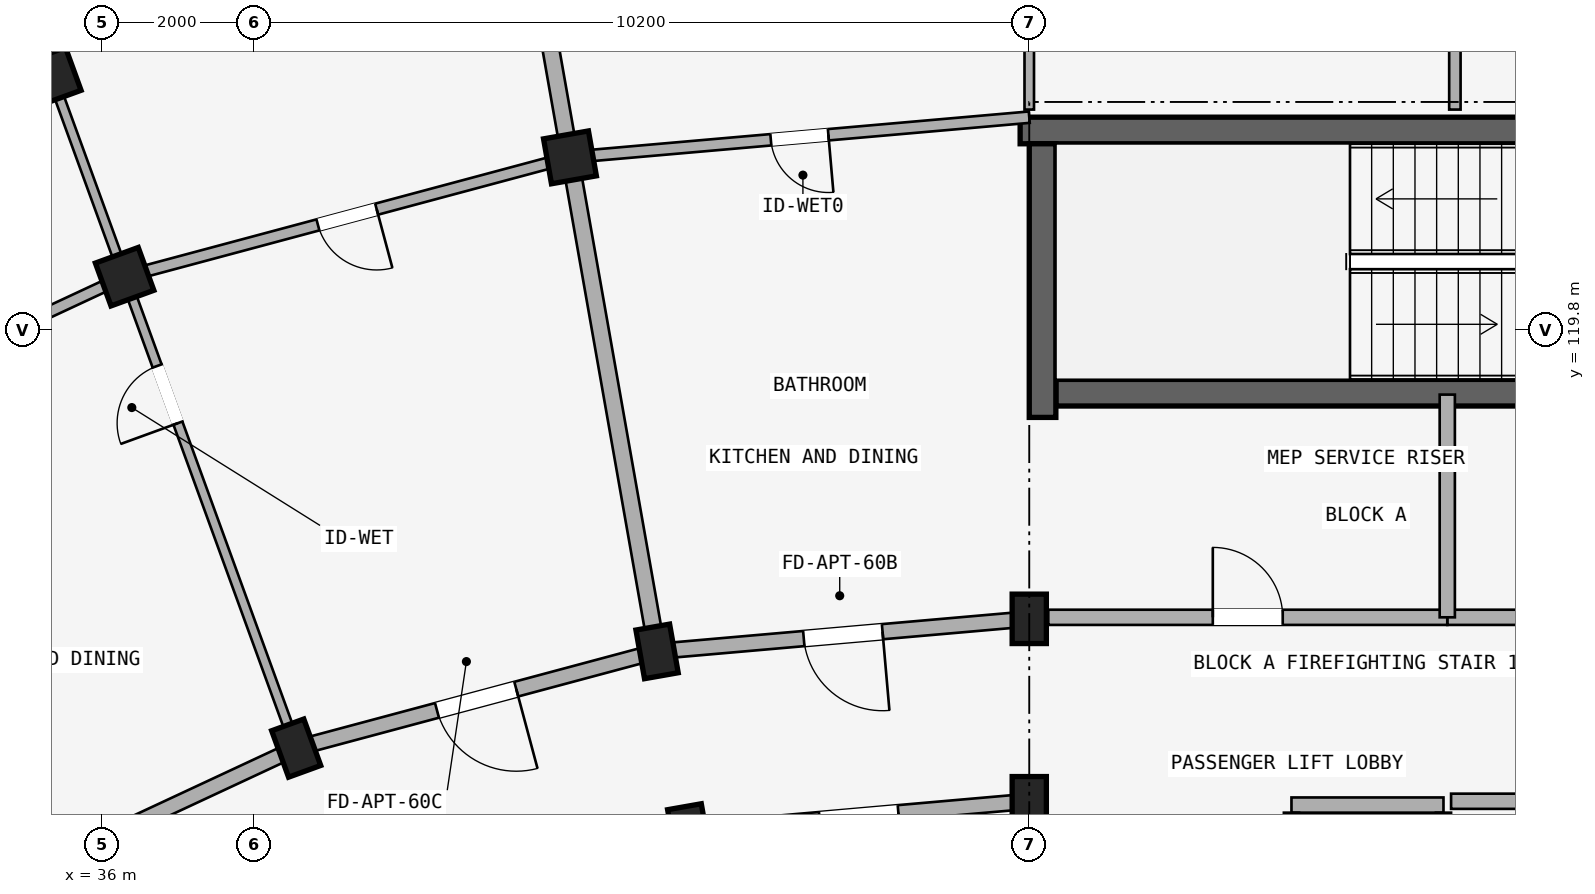
"""IFC4 building model, lengths in metres.
Left out: names, types, materials, properties, quantities, classifications, styles, units other than length and angle.
Written with IfcOpenShell. Run it as: python <this file> out.ifc"""

import sys

from ifc_helpers import new_model, si_unit, direction, frame, frame_2d, origin, origin_2d, place, context, subcontext, project, spatial, rectangle, extrude, element, fill, save


model = new_model("IFC4")
c1 = context("Model", 3, precision=1e-05, world=origin(), true_north=direction((0.0, 1.0)))
c2 = subcontext(c1, "Body", "Model", "MODEL_VIEW")
j1 = project(units=[si_unit("LENGTHUNIT", "METRE"), si_unit("PLANEANGLEUNIT", "RADIAN")], contexts=[c1])
p1 = place(None, origin())
s1 = spatial("IfcSite", under=j1, at=p1, CompositionType="ELEMENT")
p2 = place(p1, origin())
s2 = spatial("IfcBuilding", under=s1, at=p2, CompositionType="ELEMENT")
p3 = place(p2, frame((0.0, 0.0, 37.05)))
s3 = spatial("IfcBuildingStorey", under=s2, at=p3, CompositionType="ELEMENT", Elevation=37.05)
p4 = place(p3, frame((48.08, 122.425, 0.0), z_axis=(0.0, 0.0, 1.0), x_axis=(1.0, 0.0, 0.0)))
e1 = element("IfcWall", 1, at=p4, inside=s3, PredefinedType="SHEAR", context=c2, shape_type="SweptSolid", body=[
    extrude(rectangle(XDim=8.545, YDim=0.35, at=frame_2d((4.272, 0.0))), origin(), (0.0, 0.0, 1.0), 2.93),
])
p5 = place(p3, frame((48.55, 118.975, 0.0), z_axis=(0.0, 0.0, 1.0), x_axis=(1.0, 0.0, 0.0)))
e2 = element("IfcWall", 2, at=p5, inside=s3, PredefinedType="SHEAR", context=c2, shape_type="SweptSolid", body=[
    extrude(rectangle(XDim=8.075, YDim=0.35, at=frame_2d((4.038, 0.0))), origin(), (0.0, 0.0, 1.0), 2.93),
])
p6 = place(p5, frame((6.38, 0.0, 0.0)))
e3 = element("IfcOpeningElement", 3, at=p6, cuts=e2, PredefinedType="OPENING", context=c2, shape_type="SweptSolid", body=[
    extrude(rectangle(XDim=1.24, YDim=2.15, at=frame_2d((0.62, 1.075))), frame((0.0, 0.185, 0.0), z_axis=(0.0, -1.0, 0.0), x_axis=(1.0, 0.0, 0.0)), (0.0, 0.0, 1.0), 0.37),
])
p7 = place(p3, frame((48.375, 118.65, 0.0), z_axis=(0.0, 0.0, 1.0), x_axis=(0.0, 1.0, 0.0)))
e4 = element("IfcWall", 4, at=p7, inside=s3, PredefinedType="SHEAR", context=c2, shape_type="SweptSolid", body=[
    extrude(rectangle(XDim=3.6, YDim=0.35, at=frame_2d((1.8, 0.0))), origin(), (0.0, 0.0, 1.0), 2.93),
])
for number, where, z_axis, x_axis in (
    (5, (48.2, 113.6, 0.0), (0.0, 0.0, 1.0), (1.0, 0.0, 0.0)),
    (6, (48.2, 116.0, 0.0), (0.0, 0.0, 1.0), (1.0, 0.0, 0.0)),
    (7, (43.72, 113.208, 0.0), (0.0, 0.0, 1.0), (0.985, 0.174, 0.0)),
    (8, (43.303, 115.572, 0.0), (0.0, 0.0, 1.0), (0.985, 0.174, 0.0)),
):
    element("IfcColumn", number, at=place(p3, frame(where, z_axis=z_axis, x_axis=x_axis)), inside=s3, PredefinedType="COLUMN", context=c2, shape_type="SweptSolid", body=[
        extrude(rectangle(XDim=0.45, YDim=0.65, at=origin_2d()), origin(), (0.0, 0.0, 1.0), 2.93),
    ])
p8 = place(p3, frame((42.157, 122.071, 0.0), z_axis=(0.0, 0.0, 1.0), x_axis=(0.984807753012, 0.173648177667, 0.0)))
e9 = element("IfcColumn", 9, at=p8, inside=s3, PredefinedType="COLUMN", context=c2, shape_type="SweptSolid", body=[
    extrude(rectangle(XDim=0.6, YDim=0.6, at=origin_2d()), origin(), (0.0, 0.0, 1.0), 2.93),
])
p9 = place(p3, frame((38.555, 114.299, 0.0), z_axis=(0.0, 0.0, 1.0), x_axis=(0.939692620786, 0.342020143326, 0.0)))
e10 = element("IfcColumn", 10, at=p9, inside=s3, PredefinedType="COLUMN", context=c2, shape_type="SweptSolid", body=[
    extrude(rectangle(XDim=0.45, YDim=0.65, at=origin_2d()), origin(), (0.0, 0.0, 1.0), 2.93),
])
for number, where, z_axis, x_axis in (
    (11, (36.298, 120.501, 0.0), (0.0, 0.0, 1.0), (0.94, 0.342, 0.0)),
    (12, (35.34, 123.132, 0.0), (0.0, 0.0, 1.0), (0.94, 0.342, 0.0)),
):
    element("IfcColumn", number, at=place(p3, frame(where, z_axis=z_axis, x_axis=x_axis)), inside=s3, PredefinedType="COLUMN", context=c2, shape_type="SweptSolid", body=[
        extrude(rectangle(XDim=0.6, YDim=0.6, at=origin_2d()), origin(), (0.0, 0.0, 1.0), 2.93),
    ])
p10 = place(p3, frame((53.7, 116.02, 0.0), z_axis=(0.0, 0.0, 1.0), x_axis=(1.0, 0.0, 0.0)))
e13 = element("IfcWall", 13, at=p10, inside=s3, PredefinedType="STANDARD", context=c2, shape_type="SweptSolid", body=[
    extrude(rectangle(XDim=5.65, YDim=0.2, at=frame_2d((2.825, 0.0))), origin(), (0.0, 0.0, 1.0), 2.372),
])
p11 = place(p10, frame((1.923, 0.0, 0.0)))
e14 = element("IfcOpeningElement", 14, at=p11, cuts=e13, PredefinedType="OPENING", context=c2, shape_type="SweptSolid", body=[
    extrude(rectangle(XDim=1.24, YDim=2.15, at=frame_2d((0.62, 1.075))), frame((0.0, 0.11, 0.0), z_axis=(0.0, -1.0, 0.0), x_axis=(1.0, 0.0, 0.0)), (0.0, 0.0, 1.0), 0.22),
])
p12 = place(p3, frame((48.45, 116.02, 0.0), z_axis=(0.0, 0.0, 1.0), x_axis=(1.0, 0.0, 0.0)))
e15 = element("IfcWall", 15, at=p12, inside=s3, PredefinedType="STANDARD", context=c2, shape_type="SweptSolid", body=[
    extrude(rectangle(XDim=5.25, YDim=0.2, at=frame_2d((2.625, 0.0))), origin(), (0.0, 0.0, 1.0), 2.372),
])
p13 = place(p12, frame((2.165, 0.0, 0.0)))
e16 = element("IfcOpeningElement", 16, at=p13, cuts=e15, PredefinedType="OPENING", context=c2, shape_type="SweptSolid", body=[
    extrude(rectangle(XDim=0.92, YDim=2.1, at=frame_2d((0.46, 1.05))), frame((0.0, 0.11, 0.0), z_axis=(0.0, -1.0, 0.0), x_axis=(1.0, 0.0, 0.0)), (0.0, 0.0, 1.0), 0.22),
])
p14 = place(p3, frame((53.7, 116.02, 0.0), z_axis=(0.0, 0.0, 1.0), x_axis=(0.0, 1.0, 0.0)))
e17 = element("IfcWall", 17, at=p14, inside=s3, PredefinedType="STANDARD", context=c2, shape_type="SweptSolid", body=[
    extrude(rectangle(XDim=2.93, YDim=0.2, at=frame_2d((1.465, 0.0))), origin(), (0.0, 0.0, 1.0), 2.372),
])
p15 = place(p3, frame((51.65, 113.55, 0.0), z_axis=(0.0, 0.0, 1.0), x_axis=(1.0, 0.0, 0.0)))
e18 = element("IfcWall", 18, at=p15, inside=s3, PredefinedType="STANDARD", context=c2, shape_type="SweptSolid", body=[
    extrude(rectangle(XDim=2.0, YDim=0.2, at=frame_2d((1.0, 0.0))), origin(), (0.0, 0.0, 1.0), 2.372),
])
p16 = place(p3, frame((51.65, 110.85, 0.0), z_axis=(0.0, 0.0, 1.0), x_axis=(0.0, 1.0, 0.0)))
e19 = element("IfcWall", 19, at=p16, inside=s3, PredefinedType="STANDARD", context=c2, shape_type="SweptSolid", body=[
    extrude(rectangle(XDim=2.6, YDim=0.2, at=frame_2d((1.3, 0.0))), origin(), (0.0, 0.0, 1.0), 2.372),
])
p17 = place(p3, frame((53.65, 110.85, 0.0), z_axis=(0.0, 0.0, 1.0), x_axis=(0.0, 1.0, 0.0)))
e20 = element("IfcWall", 20, at=p17, inside=s3, PredefinedType="STANDARD", context=c2, shape_type="SweptSolid", body=[
    extrude(rectangle(XDim=2.6, YDim=0.2, at=frame_2d((1.3, 0.0))), origin(), (0.0, 0.0, 1.0), 2.372),
])
p18 = place(p17, frame((0.79, 0.0, 0.0)))
e21 = element("IfcOpeningElement", 21, at=p18, cuts=e20, PredefinedType="OPENING", context=c2, shape_type="SweptSolid", body=[
    extrude(rectangle(XDim=1.02, YDim=2.15, at=frame_2d((0.51, 1.075))), frame((0.0, 0.11, 0.0), z_axis=(0.0, -1.0, 0.0), x_axis=(1.0, 0.0, 0.0)), (0.0, 0.0, 1.0), 0.22),
])
p19 = place(p3, frame((53.75, 113.6, 0.0), z_axis=(0.0, 0.0, 1.0), x_axis=(1.0, 0.0, 0.0)))
e22 = element("IfcWall", 22, at=p19, inside=s3, PredefinedType="STANDARD", context=c2, shape_type="SweptSolid", body=[
    extrude(rectangle(XDim=5.6, YDim=0.2, at=frame_2d((2.8, 0.0))), origin(), (0.0, 0.0, 1.0), 2.372),
])
p20 = place(p19, frame((1.91, 0.0, 0.0)))
e23 = element("IfcOpeningElement", 23, at=p20, cuts=e22, PredefinedType="OPENING", context=c2, shape_type="SweptSolid", body=[
    extrude(rectangle(XDim=1.22, YDim=2.15, at=frame_2d((0.61, 1.075))), frame((0.0, 0.11, 0.0), z_axis=(0.0, -1.0, 0.0), x_axis=(1.0, 0.0, 0.0)), (0.0, 0.0, 1.0), 0.22),
])
p21 = place(p3, frame((53.8, 122.7, 0.0), z_axis=(0.0, 0.0, 1.0), x_axis=(0.0, 1.0, 0.0)))
e24 = element("IfcWall", 24, at=p21, inside=s3, PredefinedType="PARTITIONING", context=c2, shape_type="SweptSolid", body=[
    extrude(rectangle(XDim=10.82, YDim=0.15, at=frame_2d((5.41, 0.0))), origin(), (0.0, 0.0, 1.0), 2.372),
])
p22 = place(p21, frame((0.899, 0.0, 0.0)))
e25 = element("IfcOpeningElement", 25, at=p22, cuts=e24, PredefinedType="OPENING", context=c2, shape_type="SweptSolid", body=[
    extrude(rectangle(XDim=0.8, YDim=2.1, at=frame_2d((0.4, 1.05))), frame((0.0, 0.085, 0.0), z_axis=(0.0, -1.0, 0.0), x_axis=(1.0, 0.0, 0.0)), (0.0, 0.0, 1.0), 0.17),
])
p23 = place(p3, frame((48.2, 113.6, 0.0), z_axis=(0.0, 0.0, 1.0), x_axis=(-0.996191949488, -0.087187153726, 0.0)))
e26 = element("IfcWall", 26, at=p23, inside=s3, PredefinedType="STANDARD", context=c2, shape_type="SweptSolid", body=[
    extrude(rectangle(XDim=4.497, YDim=0.2, at=frame_2d((2.249, 0.0))), origin(), (0.0, 0.0, 1.0), 2.372),
])
p24 = place(p23, frame((1.729, 0.0, 0.0)))
e27 = element("IfcOpeningElement", 27, at=p24, cuts=e26, PredefinedType="OPENING", context=c2, shape_type="SweptSolid", body=[
    extrude(rectangle(XDim=1.04, YDim=2.15, at=frame_2d((0.52, 1.075))), frame((0.0, 0.11, 0.0), z_axis=(0.0, -1.0, 0.0), x_axis=(1.0, 0.0, 0.0)), (0.0, 0.0, 1.0), 0.22),
])
p25 = place(p3, frame((48.2, 116.0, 0.0), z_axis=(0.0, 0.0, 1.0), x_axis=(-0.996193663584, -0.087167566415, 0.0)))
e28 = element("IfcWall", 28, at=p25, inside=s3, PredefinedType="STANDARD", context=c2, shape_type="SweptSolid", body=[
    extrude(rectangle(XDim=4.916, YDim=0.2, at=frame_2d((2.458, 0.0))), origin(), (0.0, 0.0, 1.0), 2.372),
])
p26 = place(p25, frame((1.938, 0.0, 0.0)))
e29 = element("IfcOpeningElement", 29, at=p26, cuts=e28, PredefinedType="OPENING", context=c2, shape_type="SweptSolid", body=[
    extrude(rectangle(XDim=1.04, YDim=2.15, at=frame_2d((0.52, 1.075))), frame((0.0, 0.11, 0.0), z_axis=(0.0, -1.0, 0.0), x_axis=(1.0, 0.0, 0.0)), (0.0, 0.0, 1.0), 0.22),
])
p27 = place(p3, frame((43.303, 115.572, 0.0), z_axis=(0.0, 0.0, 1.0), x_axis=(-0.965930095386, -0.258803112091, 0.0)))
e30 = element("IfcWall", 30, at=p27, inside=s3, PredefinedType="STANDARD", context=c2, shape_type="SweptSolid", body=[
    extrude(rectangle(XDim=4.916, YDim=0.2, at=frame_2d((2.458, 0.0))), origin(), (0.0, 0.0, 1.0), 2.372),
])
p28 = place(p27, frame((1.918, 0.0, 0.0)))
e31 = element("IfcOpeningElement", 31, at=p28, cuts=e30, PredefinedType="OPENING", context=c2, shape_type="SweptSolid", body=[
    extrude(rectangle(XDim=1.08, YDim=2.15, at=frame_2d((0.54, 1.075))), frame((0.0, 0.11, 0.0), z_axis=(0.0, -1.0, 0.0), x_axis=(1.0, 0.0, 0.0)), (0.0, 0.0, 1.0), 0.22),
])
p29 = place(p3, frame((38.555, 114.299, 0.0), z_axis=(0.0, 0.0, 1.0), x_axis=(-0.906302381024, -0.422629854778, 0.0)))
e32 = element("IfcWall", 32, at=p29, inside=s3, PredefinedType="STANDARD", context=c2, shape_type="SweptSolid", body=[
    extrude(rectangle(XDim=4.915, YDim=0.2, at=frame_2d((2.458, 0.0))), origin(), (0.0, 0.0, 1.0), 2.372),
])
p30 = place(p3, frame((48.2, 110.35, 0.0), z_axis=(0.0, 0.0, 1.0), x_axis=(0.0, 1.0, 0.0)))
e33 = element("IfcWall", 33, at=p30, inside=s3, PredefinedType="STANDARD", context=c2, shape_type="SweptSolid", body=[
    extrude(rectangle(XDim=3.2, YDim=0.22, at=frame_2d((1.6, 0.0))), origin(), (0.0, 0.0, 1.0), 2.372),
])
p31 = place(p3, frame((48.2, 122.7, 0.0), z_axis=(0.0, 0.0, 1.0), x_axis=(0.0, 1.0, 0.0)))
e34 = element("IfcWall", 34, at=p31, inside=s3, PredefinedType="PARTITIONING", context=c2, shape_type="SweptSolid", body=[
    extrude(rectangle(XDim=10.82, YDim=0.125, at=frame_2d((5.41, 0.0))), origin(), (0.0, 0.0, 1.0), 2.372),
])
p32 = place(p31, frame((0.899, 0.0, 0.0)))
e35 = element("IfcOpeningElement", 35, at=p32, cuts=e34, PredefinedType="OPENING", context=c2, shape_type="SweptSolid", body=[
    extrude(rectangle(XDim=0.8, YDim=2.1, at=frame_2d((0.4, 1.05))), frame((0.0, 0.073, 0.0), z_axis=(0.0, -1.0, 0.0), x_axis=(1.0, 0.0, 0.0)), (0.0, 0.0, 1.0), 0.145),
])
p33 = place(p3, frame((43.286, 115.67, 0.0), z_axis=(0.0, 0.0, 1.0), x_axis=(-0.173646216546, 0.984808098809, 0.0)))
e36 = element("IfcWall", 36, at=p33, inside=s3, PredefinedType="STANDARD", context=c2, shape_type="SweptSolid", body=[
    extrude(rectangle(XDim=17.42, YDim=0.22, at=frame_2d((8.71, 0.0))), origin(), (0.0, 0.0, 1.0), 2.372),
])
p34 = place(p3, frame((38.521, 114.393, 0.0), z_axis=(0.0, 0.0, 1.0), x_axis=(-0.342022120477, 0.939691901159, 0.0)))
e37 = element("IfcWall", 37, at=p34, inside=s3, PredefinedType="PARTITIONING", context=c2, shape_type="SweptSolid", body=[
    extrude(rectangle(XDim=17.42, YDim=0.125, at=frame_2d((8.71, 0.0))), origin(), (0.0, 0.0, 1.0), 2.372),
])
p35 = place(p34, frame((4.45, 0.0, 0.0)))
e38 = element("IfcOpeningElement", 38, at=p35, cuts=e37, PredefinedType="OPENING", context=c2, shape_type="SweptSolid", body=[
    extrude(rectangle(XDim=0.8, YDim=2.1, at=frame_2d((0.4, 1.05))), frame((0.0, 0.073, 0.0), z_axis=(0.0, -1.0, 0.0), x_axis=(1.0, 0.0, 0.0)), (0.0, 0.0, 1.0), 0.145),
])
p36 = place(p3, frame((48.2, 122.6, 0.0), z_axis=(0.0, 0.0, 1.0), x_axis=(-0.996193018494, -0.087174938512, 0.0)))
e39 = element("IfcWall", 39, at=p36, inside=s3, PredefinedType="PLUMBINGWALL", context=c2, shape_type="SweptSolid", body=[
    extrude(rectangle(XDim=6.066, YDim=0.15, at=frame_2d((3.033, 0.0))), origin(), (0.0, 0.0, 1.0), 2.372),
])
p37 = place(p36, frame((2.653, 0.0, 0.0)))
e40 = element("IfcOpeningElement", 40, at=p37, cuts=e39, PredefinedType="OPENING", context=c2, shape_type="SweptSolid", body=[
    extrude(rectangle(XDim=0.76, YDim=2.05, at=frame_2d((0.38, 1.025))), frame((0.0, 0.085, 0.0), z_axis=(0.0, -1.0, 0.0), x_axis=(1.0, 0.0, 0.0)), (0.0, 0.0, 1.0), 0.17),
])
p38 = place(p3, frame((42.157, 122.071, 0.0), z_axis=(0.0, 0.0, 1.0), x_axis=(-0.965923618901, -0.258827283048, 0.0)))
e41 = element("IfcWall", 41, at=p38, inside=s3, PredefinedType="PLUMBINGWALL", context=c2, shape_type="SweptSolid", body=[
    extrude(rectangle(XDim=6.066, YDim=0.15, at=frame_2d((3.033, 0.0))), origin(), (0.0, 0.0, 1.0), 2.372),
])
p39 = place(p38, frame((2.633, 0.0, 0.0)))
e42 = element("IfcOpeningElement", 42, at=p39, cuts=e41, PredefinedType="OPENING", context=c2, shape_type="SweptSolid", body=[
    extrude(rectangle(XDim=0.8, YDim=2.1, at=frame_2d((0.4, 1.05))), frame((0.0, 0.085, 0.0), z_axis=(0.0, -1.0, 0.0), x_axis=(1.0, 0.0, 0.0)), (0.0, 0.0, 1.0), 0.17),
])
p40 = place(p3, frame((36.298, 120.501, 0.0), z_axis=(0.0, 0.0, 1.0), x_axis=(-0.906312656069, -0.42260781991, 0.0)))
e43 = element("IfcWall", 43, at=p40, inside=s3, PredefinedType="PLUMBINGWALL", context=c2, shape_type="SweptSolid", body=[
    extrude(rectangle(XDim=6.066, YDim=0.15, at=frame_2d((3.033, 0.0))), origin(), (0.0, 0.0, 1.0), 2.372),
])
p41 = place(p40, frame((2.613, 0.0, 0.0)))
e44 = element("IfcOpeningElement", 44, at=p41, cuts=e43, PredefinedType="OPENING", context=c2, shape_type="SweptSolid", body=[
    extrude(rectangle(XDim=0.84, YDim=2.1, at=frame_2d((0.42, 1.05))), frame((0.0, 0.085, 0.0), z_axis=(0.0, -1.0, 0.0), x_axis=(1.0, 0.0, 0.0)), (0.0, 0.0, 1.0), 0.17),
])
p42 = place(p13, origin())
e45 = element("IfcDoor", 45, at=p42, inside=s3, OperationType="SINGLE_SWING_LEFT", PredefinedType="DOOR", context=c2, shape_type="SweptSolid", body=[
    extrude(rectangle(XDim=0.92, YDim=2.1, at=frame_2d((0.46, 1.05))), frame((0.0, 0.025, 0.0), z_axis=(0.0, -1.0, 0.0), x_axis=(1.0, 0.0, 0.0)), (0.0, 0.0, 1.0), 0.05),
])
fill(e16, e45)
p43 = place(p35, frame((0.8, 0.0, 0.0), z_axis=(0.0, 0.0, 1.0), x_axis=(-1.0, 0.0, 0.0)))
e46 = element("IfcDoor", 46, at=p43, inside=s3, OperationType="SINGLE_SWING_RIGHT", PredefinedType="DOOR", context=c2, shape_type="SweptSolid", body=[
    extrude(rectangle(XDim=0.8, YDim=2.1, at=frame_2d((0.4, 1.05))), frame((0.0, 0.025, 0.0), z_axis=(0.0, -1.0, 0.0), x_axis=(1.0, 0.0, 0.0)), (0.0, 0.0, 1.0), 0.05),
])
fill(e38, e46)
p44 = place(p26, origin())
e47 = element("IfcDoor", 47, at=p44, inside=s3, OperationType="SINGLE_SWING_LEFT", PredefinedType="DOOR", context=c2, shape_type="SweptSolid", body=[
    extrude(rectangle(XDim=1.04, YDim=2.15, at=frame_2d((0.52, 1.075))), frame((0.0, 0.025, 0.0), z_axis=(0.0, -1.0, 0.0), x_axis=(1.0, 0.0, 0.0)), (0.0, 0.0, 1.0), 0.05),
])
fill(e29, e47)
p45 = place(p37, frame((0.76, 0.0, 0.0), z_axis=(0.0, 0.0, 1.0), x_axis=(-1.0, 0.0, 0.0)))
e48 = element("IfcDoor", 48, at=p45, inside=s3, OperationType="SINGLE_SWING_RIGHT", PredefinedType="DOOR", context=c2, shape_type="SweptSolid", body=[
    extrude(rectangle(XDim=0.76, YDim=2.05, at=frame_2d((0.38, 1.025))), frame((0.0, 0.025, 0.0), z_axis=(0.0, -1.0, 0.0), x_axis=(1.0, 0.0, 0.0)), (0.0, 0.0, 1.0), 0.05),
])
fill(e40, e48)
p46 = place(p28, origin())
e49 = element("IfcDoor", 49, at=p46, inside=s3, OperationType="SINGLE_SWING_LEFT", PredefinedType="DOOR", context=c2, shape_type="SweptSolid", body=[
    extrude(rectangle(XDim=1.08, YDim=2.15, at=frame_2d((0.54, 1.075))), frame((0.0, 0.025, 0.0), z_axis=(0.0, -1.0, 0.0), x_axis=(1.0, 0.0, 0.0)), (0.0, 0.0, 1.0), 0.05),
])
fill(e31, e49)
p47 = place(p39, frame((0.8, 0.0, 0.0), z_axis=(0.0, 0.0, 1.0), x_axis=(-1.0, 0.0, 0.0)))
e50 = element("IfcDoor", 50, at=p47, inside=s3, OperationType="SINGLE_SWING_RIGHT", PredefinedType="DOOR", context=c2, shape_type="SweptSolid", body=[
    extrude(rectangle(XDim=0.8, YDim=2.1, at=frame_2d((0.4, 1.05))), frame((0.0, 0.025, 0.0), z_axis=(0.0, -1.0, 0.0), x_axis=(1.0, 0.0, 0.0)), (0.0, 0.0, 1.0), 0.05),
])
fill(e42, e50)
p48 = place(p24, frame((1.04, 0.0, 0.0), z_axis=(0.0, 0.0, 1.0), x_axis=(-1.0, 0.0, 0.0)))
e51 = element("IfcDoor", 51, at=p48, inside=s3, OperationType="SINGLE_SWING_RIGHT", PredefinedType="DOOR", context=c2, shape_type="SweptSolid", body=[
    extrude(rectangle(XDim=1.04, YDim=2.15, at=frame_2d((0.52, 1.075))), frame((0.0, 0.025, 0.0), z_axis=(0.0, -1.0, 0.0), x_axis=(1.0, 0.0, 0.0)), (0.0, 0.0, 1.0), 0.05),
])
fill(e27, e51)
save(model, sys.argv[1])
